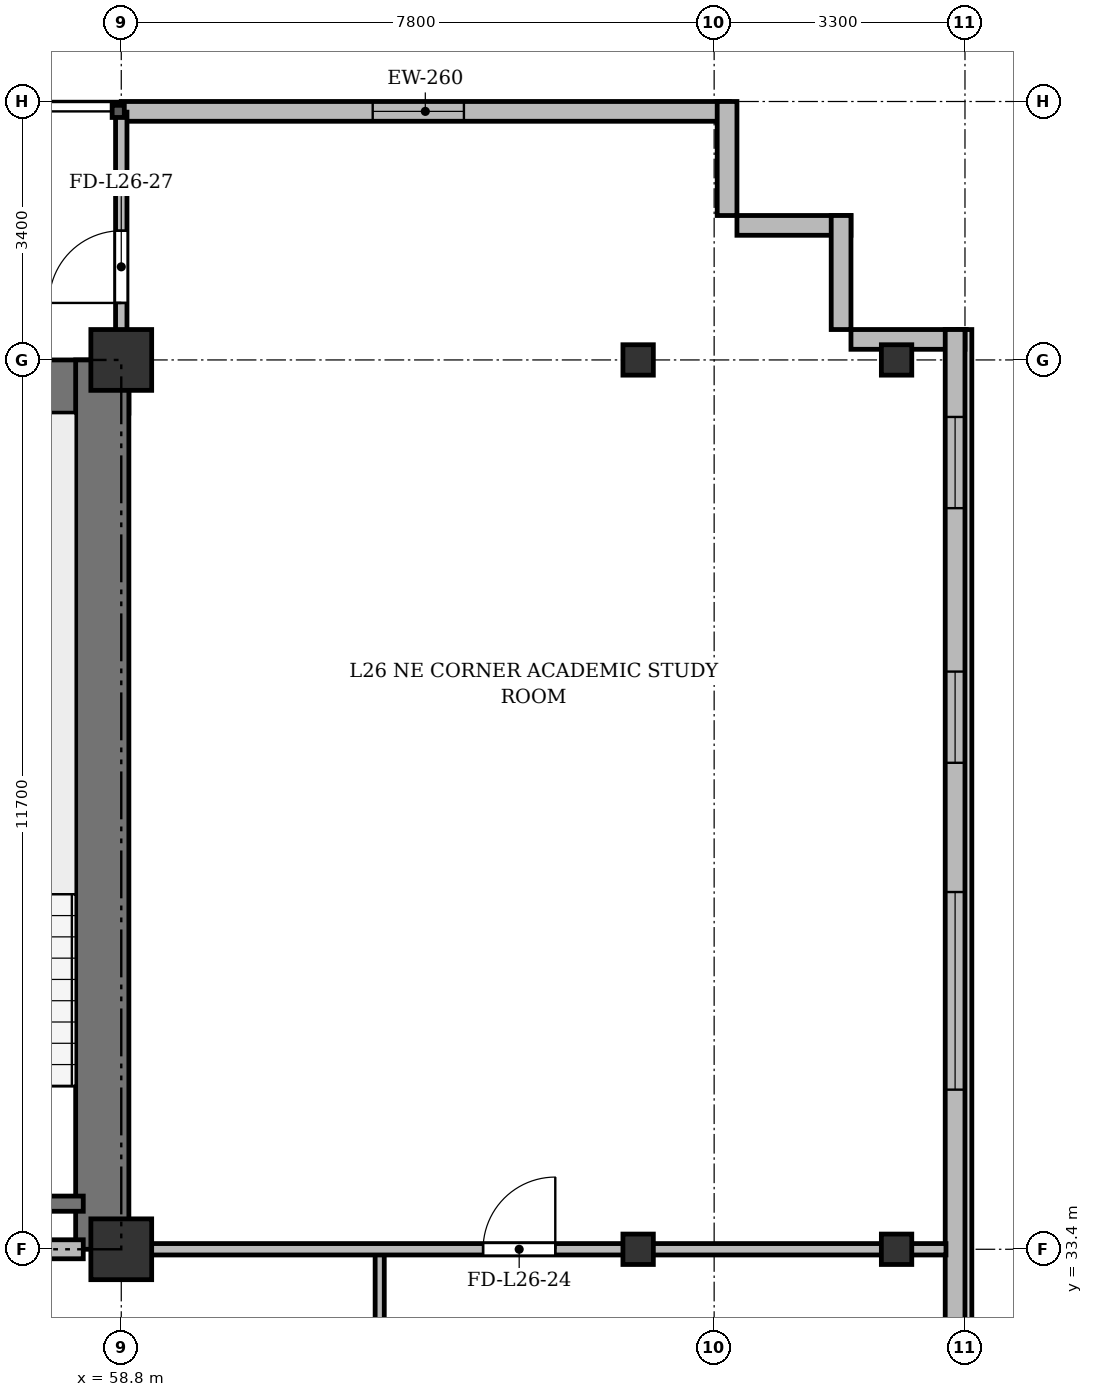
"""IFC4 building model, lengths in metres.
Left out: names, types, materials, properties, quantities, classifications, styles, units other than length and angle.
Written with IfcOpenShell. Run it as: python <this file> out.ifc"""

import sys

from ifc_helpers import new_model, si_unit, direction, frame, frame_2d, origin, origin_2d, place, context, subcontext, project, spatial, rectangle, i_section, extrude, source, transform, mapped, element, fill, save


model = new_model("IFC4")
c1 = context("Model", 3, precision=1e-05, world=origin(), true_north=direction((0.0, 1.0)))
c2 = subcontext(c1, "Body", "Model", "MODEL_VIEW")
j1 = project(units=[si_unit("LENGTHUNIT", "METRE"), si_unit("PLANEANGLEUNIT", "RADIAN")], contexts=[c1])
p1 = place(None, origin())
s1 = spatial("IfcSite", under=j1, at=p1, CompositionType="ELEMENT")
p2 = place(p1, origin())
s2 = spatial("IfcBuilding", under=s1, at=p2, CompositionType="ELEMENT")
p3 = place(p2, frame((0.0, 0.0, 103.3)))
s3 = spatial("IfcBuildingStorey", under=s2, at=p3, CompositionType="ELEMENT", Elevation=103.3)
m1 = source(origin(), c2, "Body", "SweptSolid", [
    extrude(rectangle(XDim=0.8, YDim=0.8, at=origin_2d()), origin(), (0.0, 0.0, 1.0), 3.6),
])
for number, where, z_axis, x_axis in (
    (1, (58.8, 33.4, 0.0), (0.0, 0.0, 1.0), (1.0, 0.0, 0.0)),
    (2, (58.8, 45.1, 0.0), (0.0, 0.0, 1.0), (1.0, 0.0, 0.0)),
):
    element("IfcColumn", number, at=place(p3, frame(where, z_axis=z_axis, x_axis=x_axis)), inside=s3, PredefinedType="COLUMN", context=c2, shape_type="MappedRepresentation", body=[
        mapped(m1, transform((0.0, 0.0, 0.0), x_axis=(1.0, 0.0, 0.0), y_axis=(0.0, 1.0, 0.0), z_axis=(0.0, 0.0, 1.0), scale=1.0)),
    ])
m2 = source(origin(), c2, "Body", "SweptSolid", [
    extrude(i_section(OverallWidth=0.4, OverallDepth=0.4, WebThickness=0.022, FlangeThickness=0.035, at=origin_2d()), origin(), (0.0, 0.0, 1.0), 3.6),
])
for number, where, z_axis, x_axis in (
    (3, (65.6, 33.4, 0.0), (0.0, 0.0, 1.0), (1.0, 0.0, 0.0)),
    (4, (65.6, 45.1, 0.0), (0.0, 0.0, 1.0), (1.0, 0.0, 0.0)),
    (5, (69.0, 33.4, 0.0), (0.0, 0.0, 1.0), (1.0, 0.0, 0.0)),
    (6, (69.0, 45.1, 0.0), (0.0, 0.0, 1.0), (1.0, 0.0, 0.0)),
):
    element("IfcColumn", number, at=place(p3, frame(where, z_axis=z_axis, x_axis=x_axis)), inside=s3, PredefinedType="COLUMN", context=c2, shape_type="MappedRepresentation", body=[
        mapped(m2, transform((0.0, 0.0, 0.0), x_axis=(1.0, 0.0, 0.0), y_axis=(0.0, 1.0, 0.0), z_axis=(0.0, 0.0, 1.0), scale=1.0)),
    ])
p4 = place(p3, frame((58.8, 48.37, 0.0), z_axis=(0.0, 0.0, 1.0), x_axis=(1.0, 0.0, 0.0)))
e7 = element("IfcWall", 7, at=p4, inside=s3, PredefinedType="SOLIDWALL", context=c2, shape_type="SweptSolid", body=[
    extrude(rectangle(XDim=8.0, YDim=0.26, at=frame_2d((4.0, 0.0))), origin(), (0.0, 0.0, 1.0), 3.34),
])
p5 = place(p4, frame((3.308, 0.0, 0.9)))
e8 = element("IfcOpeningElement", 8, at=p5, cuts=e7, PredefinedType="OPENING", context=c2, shape_type="SweptSolid", body=[
    extrude(rectangle(XDim=1.2, YDim=1.65, at=frame_2d((0.6, 0.825))), frame((0.0, 0.14, 0.0), z_axis=(0.0, -1.0, 0.0), x_axis=(1.0, 0.0, 0.0)), (0.0, 0.0, 1.0), 0.28),
])
for number, where, z_axis, x_axis in (
    (9, (66.77, 48.5, 0.0), (0.0, 0.0, 1.0), (0.0, -1.0, 0.0)),
    (10, (66.9, 46.87, 0.0), (0.0, 0.0, 1.0), (1.0, 0.0, 0.0)),
    (11, (68.27, 47.0, 0.0), (0.0, 0.0, 1.0), (0.0, -1.0, 0.0)),
):
    element("IfcWall", number, at=place(p3, frame(where, z_axis=z_axis, x_axis=x_axis)), inside=s3, PredefinedType="SOLIDWALL", context=c2, shape_type="SweptSolid", body=[
        extrude(rectangle(XDim=1.5, YDim=0.26, at=frame_2d((0.75, 0.0))), origin(), (0.0, 0.0, 1.0), 3.34),
    ])
p6 = place(p3, frame((68.4, 45.37, 0.0), z_axis=(0.0, 0.0, 1.0), x_axis=(1.0, 0.0, 0.0)))
e12 = element("IfcWall", 12, at=p6, inside=s3, PredefinedType="SOLIDWALL", context=c2, shape_type="SweptSolid", body=[
    extrude(rectangle(XDim=1.5, YDim=0.26, at=frame_2d((0.75, 0.0))), origin(), (0.0, 0.0, 1.0), 2.752),
])
p7 = place(p3, frame((69.77, 45.5, 0.0), z_axis=(0.0, 0.0, 1.0), x_axis=(0.0, -1.0, 0.0)))
e13 = element("IfcWall", 13, at=p7, inside=s3, PredefinedType="SOLIDWALL", context=c2, shape_type="SweptSolid", body=[
    extrude(rectangle(XDim=39.6, YDim=0.26, at=frame_2d((19.8, 0.0))), origin(), (0.0, 0.0, 1.0), 3.34),
])
p8 = place(p7, frame((36.95, 0.0, 0.92)))
e14 = element("IfcOpeningElement", 14, at=p8, cuts=e13, PredefinedType="OPENING", context=c2, shape_type="SweptSolid", body=[
    extrude(rectangle(XDim=1.2, YDim=1.65, at=frame_2d((0.6, 0.825))), frame((0.0, 0.14, 0.0), z_axis=(0.0, -1.0, 0.0), x_axis=(1.0, 0.0, 0.0)), (0.0, 0.0, 1.0), 0.28),
])
p9 = place(p7, frame((32.8, 0.0, 0.92)))
e15 = element("IfcOpeningElement", 15, at=p9, cuts=e13, PredefinedType="OPENING", context=c2, shape_type="SweptSolid", body=[
    extrude(rectangle(XDim=2.6, YDim=1.9, at=frame_2d((1.3, 0.95))), frame((0.0, 0.14, 0.0), z_axis=(0.0, -1.0, 0.0), x_axis=(1.0, 0.0, 0.0)), (0.0, 0.0, 1.0), 0.28),
])
p10 = place(p7, frame((28.6, 0.0, 0.92)))
e16 = element("IfcOpeningElement", 16, at=p10, cuts=e13, PredefinedType="OPENING", context=c2, shape_type="SweptSolid", body=[
    extrude(rectangle(XDim=2.6, YDim=1.9, at=frame_2d((1.3, 0.95))), frame((0.0, 0.14, 0.0), z_axis=(0.0, -1.0, 0.0), x_axis=(1.0, 0.0, 0.0)), (0.0, 0.0, 1.0), 0.28),
])
p11 = place(p7, frame((21.4, 0.0, 0.92)))
e17 = element("IfcOpeningElement", 17, at=p11, cuts=e13, PredefinedType="OPENING", context=c2, shape_type="SweptSolid", body=[
    extrude(rectangle(XDim=2.6, YDim=1.9, at=frame_2d((1.3, 0.95))), frame((0.0, 0.14, 0.0), z_axis=(0.0, -1.0, 0.0), x_axis=(1.0, 0.0, 0.0)), (0.0, 0.0, 1.0), 0.28),
])
p12 = place(p7, frame((7.4, 0.0, 0.92)))
e18 = element("IfcOpeningElement", 18, at=p12, cuts=e13, PredefinedType="OPENING", context=c2, shape_type="SweptSolid", body=[
    extrude(rectangle(XDim=2.6, YDim=1.9, at=frame_2d((1.3, 0.95))), frame((0.0, 0.14, 0.0), z_axis=(0.0, -1.0, 0.0), x_axis=(1.0, 0.0, 0.0)), (0.0, 0.0, 1.0), 0.28),
])
p13 = place(p7, frame((4.5, 0.0, 0.92)))
e19 = element("IfcOpeningElement", 19, at=p13, cuts=e13, PredefinedType="OPENING", context=c2, shape_type="SweptSolid", body=[
    extrude(rectangle(XDim=1.2, YDim=1.65, at=frame_2d((0.6, 0.825))), frame((0.0, 0.14, 0.0), z_axis=(0.0, -1.0, 0.0), x_axis=(1.0, 0.0, 0.0)), (0.0, 0.0, 1.0), 0.28),
])
p14 = place(p7, frame((1.15, 0.0, 0.92)))
e20 = element("IfcOpeningElement", 20, at=p14, cuts=e13, PredefinedType="OPENING", context=c2, shape_type="SweptSolid", body=[
    extrude(rectangle(XDim=1.2, YDim=1.65, at=frame_2d((0.6, 0.825))), frame((0.0, 0.14, 0.0), z_axis=(0.0, -1.0, 0.0), x_axis=(1.0, 0.0, 0.0)), (0.0, 0.0, 1.0), 0.28),
])
p15 = place(p3, frame((15.5, 44.75, 0.0), z_axis=(0.0, 0.0, 1.0), x_axis=(1.0, 0.0, 0.0)))
e21 = element("IfcWall", 21, at=p15, inside=s3, PredefinedType="SHEAR", context=c2, shape_type="SweptSolid", body=[
    extrude(rectangle(XDim=43.4, YDim=0.7, at=frame_2d((21.7, 0.0))), origin(), (0.0, 0.0, 1.0), 3.34),
])
p16 = place(p3, frame((58.55, 33.4, 0.0), z_axis=(0.0, 0.0, 1.0), x_axis=(0.0, 1.0, 0.0)))
e22 = element("IfcWall", 22, at=p16, inside=s3, PredefinedType="SHEAR", context=c2, shape_type="SweptSolid", body=[
    extrude(rectangle(XDim=11.7, YDim=0.7, at=frame_2d((5.85, 0.0))), origin(), (0.0, 0.0, 1.0), 3.34),
])
p17 = place(p3, frame((54.9, 34.0, 0.0), z_axis=(0.0, 0.0, 1.0), x_axis=(1.0, 0.0, 0.0)))
e23 = element("IfcWall", 23, at=p17, inside=s3, PredefinedType="SHEAR", context=c2, shape_type="SweptSolid", body=[
    extrude(rectangle(XDim=3.4, YDim=0.2, at=frame_2d((1.7, 0.0))), origin(), (0.0, 0.0, 1.0), 3.34),
])
p18 = place(p3, frame((47.15, 33.4, 0.0), z_axis=(0.0, 0.0, 1.0), x_axis=(1.0, 0.0, 0.0)))
e24 = element("IfcWall", 24, at=p18, inside=s3, PredefinedType="PARTITIONING", context=c2, shape_type="SweptSolid", body=[
    extrude(rectangle(XDim=11.15, YDim=0.25, at=frame_2d((5.575, 0.0))), origin(), (0.0, 0.0, 1.0), 2.752),
])
p19 = place(p18, frame((0.7, 0.0, 0.0)))
e25 = element("IfcOpeningElement", 25, at=p19, cuts=e24, PredefinedType="OPENING", context=c2, shape_type="SweptSolid", body=[
    extrude(rectangle(XDim=0.95, YDim=2.15, at=frame_2d((0.475, 1.075))), frame((0.0, 0.135, 0.0), z_axis=(0.0, -1.0, 0.0), x_axis=(1.0, 0.0, 0.0)), (0.0, 0.0, 1.0), 0.27),
])
p20 = place(p18, frame((6.0, 0.0, 0.0)))
e26 = element("IfcOpeningElement", 26, at=p20, cuts=e24, PredefinedType="OPENING", context=c2, shape_type="SweptSolid", body=[
    extrude(rectangle(XDim=1.2, YDim=2.15, at=frame_2d((0.6, 1.075))), frame((0.0, 0.135, 0.0), z_axis=(0.0, -1.0, 0.0), x_axis=(1.0, 0.0, 0.0)), (0.0, 0.0, 1.0), 0.27),
])
p21 = place(p3, frame((62.2, 29.8, 0.0), z_axis=(0.0, 0.0, 1.0), x_axis=(0.0, 1.0, 0.0)))
e27 = element("IfcWall", 27, at=p21, inside=s3, PredefinedType="PARTITIONING", context=c2, shape_type="SweptSolid", body=[
    extrude(rectangle(XDim=3.6, YDim=0.12, at=frame_2d((1.8, 0.0))), origin(), (0.0, 0.0, 1.0), 2.752),
])
p22 = place(p3, frame((58.8, 33.4, 0.0), z_axis=(0.0, 0.0, 1.0), x_axis=(1.0, 0.0, 0.0)))
e28 = element("IfcWall", 28, at=p22, inside=s3, PredefinedType="PARTITIONING", context=c2, shape_type="SweptSolid", body=[
    extrude(rectangle(XDim=10.85, YDim=0.15, at=frame_2d((5.425, 0.0))), origin(), (0.0, 0.0, 1.0), 2.752),
])
p23 = place(p22, frame((4.76, 0.0, 0.0)))
e29 = element("IfcOpeningElement", 29, at=p23, cuts=e28, PredefinedType="OPENING", context=c2, shape_type="SweptSolid", body=[
    extrude(rectangle(XDim=0.95, YDim=2.15, at=frame_2d((0.475, 1.075))), frame((0.0, 0.085, 0.0), z_axis=(0.0, -1.0, 0.0), x_axis=(1.0, 0.0, 0.0)), (0.0, 0.0, 1.0), 0.17),
])
p24 = place(p3, frame((58.8, 44.75, 0.0), z_axis=(0.0, 0.0, 1.0), x_axis=(0.0, 1.0, 0.0)))
e30 = element("IfcWall", 30, at=p24, inside=s3, PredefinedType="PARTITIONING", context=c2, shape_type="SweptSolid", body=[
    extrude(rectangle(XDim=3.61, YDim=0.15, at=frame_2d((1.805, 0.0))), origin(), (0.0, 0.0, 1.0), 2.84),
])
p25 = place(p24, frame((1.1, 0.0, 0.0)))
e31 = element("IfcOpeningElement", 31, at=p25, cuts=e30, PredefinedType="OPENING", context=c2, shape_type="SweptSolid", body=[
    extrude(rectangle(XDim=0.95, YDim=2.15, at=frame_2d((0.475, 1.075))), frame((0.0, 0.085, 0.0), z_axis=(0.0, -1.0, 0.0), x_axis=(1.0, 0.0, 0.0)), (0.0, 0.0, 1.0), 0.17),
])
m3 = source(origin(), c2, "Body", "SweptSolid", [
    extrude(rectangle(XDim=1.2, YDim=1.65, at=frame_2d((0.6, 0.825))), frame((0.0, 0.03, 0.0), z_axis=(0.0, -1.0, 0.0), x_axis=(1.0, 0.0, 0.0)), (0.0, 0.0, 1.0), 0.06),
])
p26 = place(p5, origin())
e32 = element("IfcWindow", 32, at=p26, inside=s3, PartitioningType="SINGLE_PANEL", PredefinedType="WINDOW", context=c2, shape_type="MappedRepresentation", body=[
    mapped(m3, transform((0.0, 0.0, 0.0), x_axis=(1.0, 0.0, 0.0), y_axis=(0.0, 1.0, 0.0), z_axis=(0.0, 0.0, 1.0), scale=1.0)),
])
fill(e8, e32)
m4 = source(origin(), c2, "Body", "SweptSolid", [
    extrude(rectangle(XDim=2.6, YDim=1.9, at=frame_2d((1.3, 0.95))), frame((0.0, 0.03, 0.0), z_axis=(0.0, -1.0, 0.0), x_axis=(1.0, 0.0, 0.0)), (0.0, 0.0, 1.0), 0.06),
])
p27 = place(p12, origin())
e33 = element("IfcWindow", 33, at=p27, inside=s3, PartitioningType="SINGLE_PANEL", PredefinedType="WINDOW", context=c2, shape_type="MappedRepresentation", body=[
    mapped(m4, transform((0.0, 0.0, 0.0), x_axis=(1.0, 0.0, 0.0), y_axis=(0.0, 1.0, 0.0), z_axis=(0.0, 0.0, 1.0), scale=1.0)),
])
fill(e18, e33)
p28 = place(p13, origin())
e34 = element("IfcWindow", 34, at=p28, inside=s3, PartitioningType="SINGLE_PANEL", PredefinedType="WINDOW", context=c2, shape_type="MappedRepresentation", body=[
    mapped(m3, transform((0.0, 0.0, 0.0), x_axis=(1.0, 0.0, 0.0), y_axis=(0.0, 1.0, 0.0), z_axis=(0.0, 0.0, 1.0), scale=1.0)),
])
fill(e19, e34)
p29 = place(p14, origin())
e35 = element("IfcWindow", 35, at=p29, inside=s3, PartitioningType="SINGLE_PANEL", PredefinedType="WINDOW", context=c2, shape_type="MappedRepresentation", body=[
    mapped(m3, transform((0.0, 0.0, 0.0), x_axis=(1.0, 0.0, 0.0), y_axis=(0.0, 1.0, 0.0), z_axis=(0.0, 0.0, 1.0), scale=1.0)),
])
fill(e20, e35)
m5 = source(origin(), c2, "Body", "SweptSolid", [
    extrude(rectangle(XDim=0.95, YDim=2.15, at=frame_2d((0.475, 1.075))), frame((0.0, 0.025, 0.0), z_axis=(0.0, -1.0, 0.0), x_axis=(1.0, 0.0, 0.0)), (0.0, 0.0, 1.0), 0.05),
])
p30 = place(p23, origin())
e36 = element("IfcDoor", 36, at=p30, inside=s3, OperationType="SINGLE_SWING_RIGHT", PredefinedType="DOOR", context=c2, shape_type="MappedRepresentation", body=[
    mapped(m5, transform((0.0, 0.0, 0.0), x_axis=(1.0, 0.0, 0.0), y_axis=(0.0, 1.0, 0.0), z_axis=(0.0, 0.0, 1.0), scale=1.0)),
])
fill(e29, e36)
p31 = place(p25, origin())
e37 = element("IfcDoor", 37, at=p31, inside=s3, OperationType="SINGLE_SWING_LEFT", PredefinedType="DOOR", context=c2, shape_type="MappedRepresentation", body=[
    mapped(m5, transform((0.0, 0.0, 0.0), x_axis=(1.0, 0.0, 0.0), y_axis=(0.0, 1.0, 0.0), z_axis=(0.0, 0.0, 1.0), scale=1.0)),
])
fill(e31, e37)
save(model, sys.argv[1])
